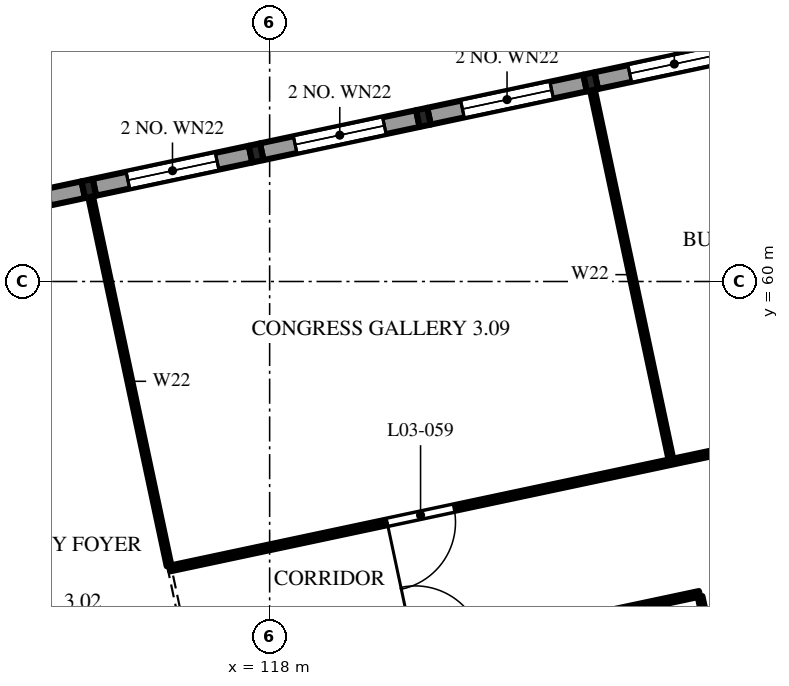
"""IFC4 building model, lengths in metres.
Left out: names, types, materials, properties, quantities, classifications, styles, units other than length and angle.
Written with IfcOpenShell. Run it as: python <this file> out.ifc"""

import sys

from ifc_helpers import new_model, si_unit, direction, frame, frame_2d, origin, origin_2d, place, context, subcontext, project, spatial, polyline, rectangle, i_section, outline, extrude, element, fill, save


model = new_model("IFC4")
c1 = context("Model", 3, precision=1e-05, world=origin(), true_north=direction((0.0, 1.0)))
c2 = subcontext(c1, "Body", "Model", "MODEL_VIEW")
j1 = project(units=[si_unit("LENGTHUNIT", "METRE"), si_unit("PLANEANGLEUNIT", "RADIAN")], contexts=[c1])
p1 = place(None, origin())
s1 = spatial("IfcSite", under=j1, at=p1, CompositionType="ELEMENT")
p2 = place(p1, origin())
s2 = spatial("IfcBuilding", under=s1, at=p2, CompositionType="ELEMENT")
p3 = place(p2, frame((0.0, 0.0, 16.8)))
s3 = spatial("IfcBuildingStorey", under=s2, at=p3, CompositionType="ELEMENT", Elevation=16.8)
for number, where, z_axis, x_axis in (
    (1, (113.243, 62.448, 0.0), (0.0, 0.0, 1.0), (0.978, 0.208, 0.0)),
    (2, (117.645, 63.383, 0.0), (0.0, 0.0, 1.0), (0.978, 0.208, 0.0)),
    (3, (122.046, 64.319, 0.0), (0.0, 0.0, 1.0), (0.978, 0.208, 0.0)),
    (4, (126.448, 65.254, 0.0), (0.0, 0.0, 1.0), (0.978, 0.208, 0.0)),
):
    element("IfcColumn", number, at=place(p3, frame(where, z_axis=z_axis, x_axis=x_axis)), inside=s3, PredefinedType="COLUMN", context=c2, shape_type="SweptSolid", body=[
        extrude(i_section(OverallWidth=0.3, OverallDepth=0.45, WebThickness=0.014, FlangeThickness=0.026, FilletRadius=0.027, at=origin_2d()), origin(), (0.0, 0.0, 1.0), 4.8),
    ])
p4 = place(p3, frame((108.988, 61.543, 0.0), z_axis=(0.0, 0.0, 1.0), x_axis=(0.978143927149, 0.207928972925, 0.0)))
e5 = element("IfcWall", 5, at=p4, inside=s3, PredefinedType="SOLIDWALL", context=c2, shape_type="SweptSolid", body=[
    extrude(outline(polyline([(0.0, 0.0), (4.2, 0.0), (4.2, 9.984), (0.0, 9.76), (0.0, 0.0)])), frame((0.0, 0.225, 0.0), z_axis=(0.0, -1.0, 0.0), x_axis=(1.0, 0.0, 0.0)), (0.0, 0.0, 1.0), 0.45),
])
p5 = place(p4, frame((0.9, 0.0, 0.45)))
e6 = element("IfcOpeningElement", 6, at=p5, cuts=e5, PredefinedType="OPENING", context=c2, shape_type="SweptSolid", body=[
    extrude(rectangle(XDim=2.4, YDim=3.3, at=frame_2d((1.2, 1.65))), frame((0.0, 0.235, 0.0), z_axis=(0.0, -1.0, 0.0), x_axis=(1.0, 0.0, 0.0)), (0.0, 0.0, 1.0), 0.47),
])
p6 = place(p3, frame((113.389, 62.479, 0.0), z_axis=(0.0, 0.0, 1.0), x_axis=(0.978146440129, 0.207917150959, 0.0)))
e7 = element("IfcWall", 7, at=p6, inside=s3, PredefinedType="SOLIDWALL", context=c2, shape_type="SweptSolid", body=[
    extrude(outline(polyline([(0.0, 0.0), (4.2, 0.0), (4.2, 10.225), (0.0, 10.0), (0.0, 0.0)])), frame((0.0, 0.225, 0.0), z_axis=(0.0, -1.0, 0.0), x_axis=(1.0, 0.0, 0.0)), (0.0, 0.0, 1.0), 0.45),
])
p7 = place(p6, frame((0.9, 0.0, 0.9)))
e8 = element("IfcOpeningElement", 8, at=p7, cuts=e7, PredefinedType="OPENING", context=c2, shape_type="SweptSolid", body=[
    extrude(rectangle(XDim=2.4, YDim=2.4, at=frame_2d((1.2, 1.2))), frame((0.0, 0.235, 0.0), z_axis=(0.0, -1.0, 0.0), x_axis=(1.0, 0.0, 0.0)), (0.0, 0.0, 1.0), 0.47),
])
p8 = place(p6, frame((0.9, 0.0, 5.1)))
e9 = element("IfcOpeningElement", 9, at=p8, cuts=e7, PredefinedType="OPENING", context=c2, shape_type="SweptSolid", body=[
    extrude(rectangle(XDim=2.4, YDim=2.4, at=frame_2d((1.2, 1.2))), frame((0.0, 0.235, 0.0), z_axis=(0.0, -1.0, 0.0), x_axis=(1.0, 0.0, 0.0)), (0.0, 0.0, 1.0), 0.47),
])
p9 = place(p3, frame((117.791, 63.414, 0.0), z_axis=(0.0, 0.0, 1.0), x_axis=(0.978146440129, 0.207917150959, 0.0)))
e10 = element("IfcWall", 10, at=p9, inside=s3, PredefinedType="SOLIDWALL", context=c2, shape_type="SweptSolid", body=[
    extrude(outline(polyline([(0.0, 0.0), (4.2, 0.0), (4.2, 10.466), (0.0, 10.241), (0.0, 0.0)])), frame((0.0, 0.225, 0.0), z_axis=(0.0, -1.0, 0.0), x_axis=(1.0, 0.0, 0.0)), (0.0, 0.0, 1.0), 0.45),
])
p10 = place(p9, frame((0.9, 0.0, 0.9)))
e11 = element("IfcOpeningElement", 11, at=p10, cuts=e10, PredefinedType="OPENING", context=c2, shape_type="SweptSolid", body=[
    extrude(rectangle(XDim=2.4, YDim=2.4, at=frame_2d((1.2, 1.2))), frame((0.0, 0.235, 0.0), z_axis=(0.0, -1.0, 0.0), x_axis=(1.0, 0.0, 0.0)), (0.0, 0.0, 1.0), 0.47),
])
p11 = place(p9, frame((0.9, 0.0, 5.1)))
e12 = element("IfcOpeningElement", 12, at=p11, cuts=e10, PredefinedType="OPENING", context=c2, shape_type="SweptSolid", body=[
    extrude(rectangle(XDim=2.4, YDim=2.4, at=frame_2d((1.2, 1.2))), frame((0.0, 0.235, 0.0), z_axis=(0.0, -1.0, 0.0), x_axis=(1.0, 0.0, 0.0)), (0.0, 0.0, 1.0), 0.47),
])
p12 = place(p3, frame((122.193, 64.35, 0.0), z_axis=(0.0, 0.0, 1.0), x_axis=(0.978155748334, 0.207873355681, 0.0)))
e13 = element("IfcWall", 13, at=p12, inside=s3, PredefinedType="SOLIDWALL", context=c2, shape_type="SweptSolid", body=[
    extrude(outline(polyline([(0.0, 0.0), (4.2, 0.0), (4.2, 10.707), (0.0, 10.482), (0.0, 0.0)])), frame((0.0, 0.225, 0.0), z_axis=(0.0, -1.0, 0.0), x_axis=(1.0, 0.0, 0.0)), (0.0, 0.0, 1.0), 0.45),
])
p13 = place(p12, frame((0.9, 0.0, 0.9)))
e14 = element("IfcOpeningElement", 14, at=p13, cuts=e13, PredefinedType="OPENING", context=c2, shape_type="SweptSolid", body=[
    extrude(rectangle(XDim=2.4, YDim=2.4, at=frame_2d((1.2, 1.2))), frame((0.0, 0.235, 0.0), z_axis=(0.0, -1.0, 0.0), x_axis=(1.0, 0.0, 0.0)), (0.0, 0.0, 1.0), 0.47),
])
p14 = place(p12, frame((0.9, 0.0, 5.1)))
e15 = element("IfcOpeningElement", 15, at=p14, cuts=e13, PredefinedType="OPENING", context=c2, shape_type="SweptSolid", body=[
    extrude(rectangle(XDim=2.4, YDim=2.4, at=frame_2d((1.2, 1.2))), frame((0.0, 0.235, 0.0), z_axis=(0.0, -1.0, 0.0), x_axis=(1.0, 0.0, 0.0)), (0.0, 0.0, 1.0), 0.47),
])
p15 = place(p3, frame((126.594, 65.286, 0.0), z_axis=(0.0, 0.0, 1.0), x_axis=(0.978143927149, 0.207928972925, 0.0)))
e16 = element("IfcWall", 16, at=p15, inside=s3, PredefinedType="SOLIDWALL", context=c2, shape_type="SweptSolid", body=[
    extrude(outline(polyline([(0.0, 0.0), (4.2, 0.0), (4.2, 10.947), (0.0, 10.723), (0.0, 0.0)])), frame((0.0, 0.225, 0.0), z_axis=(0.0, -1.0, 0.0), x_axis=(1.0, 0.0, 0.0)), (0.0, 0.0, 1.0), 0.45),
])
p16 = place(p15, frame((0.9, 0.0, 0.9)))
e17 = element("IfcOpeningElement", 17, at=p16, cuts=e16, PredefinedType="OPENING", context=c2, shape_type="SweptSolid", body=[
    extrude(rectangle(XDim=2.4, YDim=2.4, at=frame_2d((1.2, 1.2))), frame((0.0, 0.235, 0.0), z_axis=(0.0, -1.0, 0.0), x_axis=(1.0, 0.0, 0.0)), (0.0, 0.0, 1.0), 0.47),
])
p17 = place(p15, frame((0.9, 0.0, 5.1)))
e18 = element("IfcOpeningElement", 18, at=p17, cuts=e16, PredefinedType="OPENING", context=c2, shape_type="SweptSolid", body=[
    extrude(rectangle(XDim=2.4, YDim=2.4, at=frame_2d((1.2, 1.2))), frame((0.0, 0.235, 0.0), z_axis=(0.0, -1.0, 0.0), x_axis=(1.0, 0.0, 0.0)), (0.0, 0.0, 1.0), 0.47),
])
p18 = place(p3, frame((80.893, 41.489, 0.0), z_axis=(0.0, 0.0, 1.0), x_axis=(0.97814724207, 0.20791337819, 0.0)))
e19 = element("IfcWall", 19, at=p18, inside=s3, PredefinedType="PARTITIONING", context=c2, shape_type="SweptSolid", body=[
    extrude(outline(polyline([(0.0, 0.0), (49.5, 0.0), (49.5, 9.336), (0.0, 6.688), (0.0, 0.0)])), frame((0.0, 0.075, 0.0), z_axis=(0.0, -1.0, 0.0), x_axis=(1.0, 0.0, 0.0)), (0.0, 0.0, 1.0), 0.15),
])
p19 = place(p18, frame((5.85, 0.0, 0.0)))
e20 = element("IfcOpeningElement", 20, at=p19, cuts=e19, PredefinedType="OPENING", context=c2, shape_type="SweptSolid", body=[
    extrude(rectangle(XDim=1.8, YDim=2.1, at=frame_2d((0.9, 1.05))), frame((0.0, 0.085, 0.0), z_axis=(0.0, -1.0, 0.0), x_axis=(1.0, 0.0, 0.0)), (0.0, 0.0, 1.0), 0.17),
])
p20 = place(p18, frame((17.25, 0.0, 0.0)))
e21 = element("IfcOpeningElement", 21, at=p20, cuts=e19, PredefinedType="OPENING", context=c2, shape_type="SweptSolid", body=[
    extrude(rectangle(XDim=1.5, YDim=2.1, at=frame_2d((0.75, 1.05))), frame((0.0, 0.085, 0.0), z_axis=(0.0, -1.0, 0.0), x_axis=(1.0, 0.0, 0.0)), (0.0, 0.0, 1.0), 0.17),
])
p21 = place(p18, frame((28.35, 0.0, 0.0)))
e22 = element("IfcOpeningElement", 22, at=p21, cuts=e19, PredefinedType="OPENING", context=c2, shape_type="SweptSolid", body=[
    extrude(rectangle(XDim=1.8, YDim=2.1, at=frame_2d((0.9, 1.05))), frame((0.0, 0.085, 0.0), z_axis=(0.0, -1.0, 0.0), x_axis=(1.0, 0.0, 0.0)), (0.0, 0.0, 1.0), 0.17),
])
p22 = place(p18, frame((41.85, 0.0, 0.0)))
e23 = element("IfcOpeningElement", 23, at=p22, cuts=e19, PredefinedType="OPENING", context=c2, shape_type="SweptSolid", body=[
    extrude(rectangle(XDim=1.8, YDim=2.1, at=frame_2d((0.9, 1.05))), frame((0.0, 0.085, 0.0), z_axis=(0.0, -1.0, 0.0), x_axis=(1.0, 0.0, 0.0)), (0.0, 0.0, 1.0), 0.17),
])
p23 = place(p3, frame((131.391, 41.999, 0.0), z_axis=(0.0, 0.0, 1.0), x_axis=(-0.20790935802, 0.978148096582, 0.0)))
e24 = element("IfcWall", 24, at=p23, inside=s3, PredefinedType="PARTITIONING", context=c2, shape_type="SweptSolid", body=[
    extrude(outline(polyline([(0.0, 0.0), (9.925, 0.0), (9.925, 8.622), (0.0, 8.622), (0.0, 0.0)])), frame((0.0, 0.062, 0.0), z_axis=(0.0, -1.0, 0.0), x_axis=(1.0, 0.0, 0.0)), (0.0, 0.0, 1.0), 0.125),
])
p24 = place(p3, frame((115.369, 52.446, 0.0), z_axis=(0.0, 0.0, 1.0), x_axis=(0.978147680869, 0.207911313813, 0.0)))
e25 = element("IfcWall", 25, at=p24, inside=s3, PredefinedType="PARTITIONING", context=c2, shape_type="SweptSolid", body=[
    extrude(outline(polyline([(0.0, 0.0), (40.5, 0.0), (40.5, 10.595), (0.0, 8.428), (0.0, 0.0)])), frame((0.0, 0.075, 0.0), z_axis=(0.0, -1.0, 0.0), x_axis=(1.0, 0.0, 0.0)), (0.0, 0.0, 1.0), 0.15),
])
p25 = place(p24, frame((5.85, 0.0, 0.0)))
e26 = element("IfcOpeningElement", 26, at=p25, cuts=e25, PredefinedType="OPENING", context=c2, shape_type="SweptSolid", body=[
    extrude(rectangle(XDim=1.8, YDim=2.1, at=frame_2d((0.9, 1.05))), frame((0.0, 0.085, 0.0), z_axis=(0.0, -1.0, 0.0), x_axis=(1.0, 0.0, 0.0)), (0.0, 0.0, 1.0), 0.17),
])
p26 = place(p24, frame((17.1, 0.0, 0.0)))
e27 = element("IfcOpeningElement", 27, at=p26, cuts=e25, PredefinedType="OPENING", context=c2, shape_type="SweptSolid", body=[
    extrude(rectangle(XDim=1.8, YDim=2.1, at=frame_2d((0.9, 1.05))), frame((0.0, 0.085, 0.0), z_axis=(0.0, -1.0, 0.0), x_axis=(1.0, 0.0, 0.0)), (0.0, 0.0, 1.0), 0.17),
])
p27 = place(p24, frame((28.35, 0.0, 0.0)))
e28 = element("IfcOpeningElement", 28, at=p27, cuts=e25, PredefinedType="OPENING", context=c2, shape_type="SweptSolid", body=[
    extrude(rectangle(XDim=1.8, YDim=2.1, at=frame_2d((0.9, 1.05))), frame((0.0, 0.085, 0.0), z_axis=(0.0, -1.0, 0.0), x_axis=(1.0, 0.0, 0.0)), (0.0, 0.0, 1.0), 0.17),
])
p28 = place(p24, frame((37.75, 0.0, 0.0)))
e29 = element("IfcOpeningElement", 29, at=p28, cuts=e25, PredefinedType="OPENING", context=c2, shape_type="SweptSolid", body=[
    extrude(rectangle(XDim=1.0, YDim=2.1, at=frame_2d((0.5, 1.05))), frame((0.0, 0.085, 0.0), z_axis=(0.0, -1.0, 0.0), x_axis=(1.0, 0.0, 0.0)), (0.0, 0.0, 1.0), 0.17),
])
p29 = place(p3, frame((113.29, 62.228, 0.0), z_axis=(0.0, 0.0, 1.0), x_axis=(0.20790935802, -0.978148096582, 0.0)))
e30 = element("IfcWall", 30, at=p29, inside=s3, PredefinedType="PARTITIONING", context=c2, shape_type="SweptSolid", body=[
    extrude(outline(polyline([(0.0, 0.0), (9.925, 0.0), (9.925, 7.899), (0.0, 7.899), (0.0, 0.0)])), frame((0.0, 0.062, 0.0), z_axis=(0.0, -1.0, 0.0), x_axis=(1.0, 0.0, 0.0)), (0.0, 0.0, 1.0), 0.125),
])
p30 = place(p3, frame((126.495, 65.034, 0.0), z_axis=(0.0, 0.0, 1.0), x_axis=(0.207904355568, -0.978149159861, 0.0)))
e31 = element("IfcWall", 31, at=p30, inside=s3, PredefinedType="PARTITIONING", context=c2, shape_type="SweptSolid", body=[
    extrude(outline(polyline([(0.0, 0.0), (9.925, 0.0), (9.925, 8.622), (0.0, 8.622), (0.0, 0.0)])), frame((0.0, 0.062, 0.0), z_axis=(0.0, -1.0, 0.0), x_axis=(1.0, 0.0, 0.0)), (0.0, 0.0, 1.0), 0.125),
])
p31 = place(p7, origin())
e32 = element("IfcWindow", 32, at=p31, inside=s3, PartitioningType="SINGLE_PANEL", PredefinedType="WINDOW", context=c2, shape_type="SweptSolid", body=[
    extrude(rectangle(XDim=2.4, YDim=2.4, at=frame_2d((1.2, 1.2))), frame((0.0, 0.03, 0.0), z_axis=(0.0, -1.0, 0.0), x_axis=(1.0, 0.0, 0.0)), (0.0, 0.0, 1.0), 0.06),
])
fill(e8, e32)
p32 = place(p8, origin())
e33 = element("IfcWindow", 33, at=p32, inside=s3, PartitioningType="SINGLE_PANEL", PredefinedType="WINDOW", context=c2, shape_type="SweptSolid", body=[
    extrude(rectangle(XDim=2.4, YDim=2.4, at=frame_2d((1.2, 1.2))), frame((0.0, 0.03, 0.0), z_axis=(0.0, -1.0, 0.0), x_axis=(1.0, 0.0, 0.0)), (0.0, 0.0, 1.0), 0.06),
])
fill(e9, e33)
p33 = place(p10, origin())
e34 = element("IfcWindow", 34, at=p33, inside=s3, PartitioningType="SINGLE_PANEL", PredefinedType="WINDOW", context=c2, shape_type="SweptSolid", body=[
    extrude(rectangle(XDim=2.4, YDim=2.4, at=frame_2d((1.2, 1.2))), frame((0.0, 0.03, 0.0), z_axis=(0.0, -1.0, 0.0), x_axis=(1.0, 0.0, 0.0)), (0.0, 0.0, 1.0), 0.06),
])
fill(e11, e34)
p34 = place(p11, origin())
e35 = element("IfcWindow", 35, at=p34, inside=s3, PartitioningType="SINGLE_PANEL", PredefinedType="WINDOW", context=c2, shape_type="SweptSolid", body=[
    extrude(rectangle(XDim=2.4, YDim=2.4, at=frame_2d((1.2, 1.2))), frame((0.0, 0.03, 0.0), z_axis=(0.0, -1.0, 0.0), x_axis=(1.0, 0.0, 0.0)), (0.0, 0.0, 1.0), 0.06),
])
fill(e12, e35)
p35 = place(p13, origin())
e36 = element("IfcWindow", 36, at=p35, inside=s3, PartitioningType="SINGLE_PANEL", PredefinedType="WINDOW", context=c2, shape_type="SweptSolid", body=[
    extrude(rectangle(XDim=2.4, YDim=2.4, at=frame_2d((1.2, 1.2))), frame((0.0, 0.03, 0.0), z_axis=(0.0, -1.0, 0.0), x_axis=(1.0, 0.0, 0.0)), (0.0, 0.0, 1.0), 0.06),
])
fill(e14, e36)
p36 = place(p14, origin())
e37 = element("IfcWindow", 37, at=p36, inside=s3, PartitioningType="SINGLE_PANEL", PredefinedType="WINDOW", context=c2, shape_type="SweptSolid", body=[
    extrude(rectangle(XDim=2.4, YDim=2.4, at=frame_2d((1.2, 1.2))), frame((0.0, 0.03, 0.0), z_axis=(0.0, -1.0, 0.0), x_axis=(1.0, 0.0, 0.0)), (0.0, 0.0, 1.0), 0.06),
])
fill(e15, e37)
p37 = place(p16, origin())
e38 = element("IfcWindow", 38, at=p37, inside=s3, PartitioningType="SINGLE_PANEL", PredefinedType="WINDOW", context=c2, shape_type="SweptSolid", body=[
    extrude(rectangle(XDim=2.4, YDim=2.4, at=frame_2d((1.2, 1.2))), frame((0.0, 0.03, 0.0), z_axis=(0.0, -1.0, 0.0), x_axis=(1.0, 0.0, 0.0)), (0.0, 0.0, 1.0), 0.06),
])
fill(e17, e38)
p38 = place(p17, origin())
e39 = element("IfcWindow", 39, at=p38, inside=s3, PartitioningType="SINGLE_PANEL", PredefinedType="WINDOW", context=c2, shape_type="SweptSolid", body=[
    extrude(rectangle(XDim=2.4, YDim=2.4, at=frame_2d((1.2, 1.2))), frame((0.0, 0.03, 0.0), z_axis=(0.0, -1.0, 0.0), x_axis=(1.0, 0.0, 0.0)), (0.0, 0.0, 1.0), 0.06),
])
fill(e18, e39)
p39 = place(p25, frame((1.8, 0.0, 0.0), z_axis=(0.0, 0.0, 1.0), x_axis=(-1.0, 0.0, 0.0)))
e40 = element("IfcDoor", 40, at=p39, inside=s3, OperationType="DOUBLE_DOOR_SINGLE_SWING", PredefinedType="DOOR", context=c2, shape_type="SweptSolid", body=[
    extrude(rectangle(XDim=1.8, YDim=2.1, at=frame_2d((0.9, 1.05))), frame((0.0, 0.025, 0.0), z_axis=(0.0, -1.0, 0.0), x_axis=(1.0, 0.0, 0.0)), (0.0, 0.0, 1.0), 0.05),
])
fill(e26, e40)
save(model, sys.argv[1])
